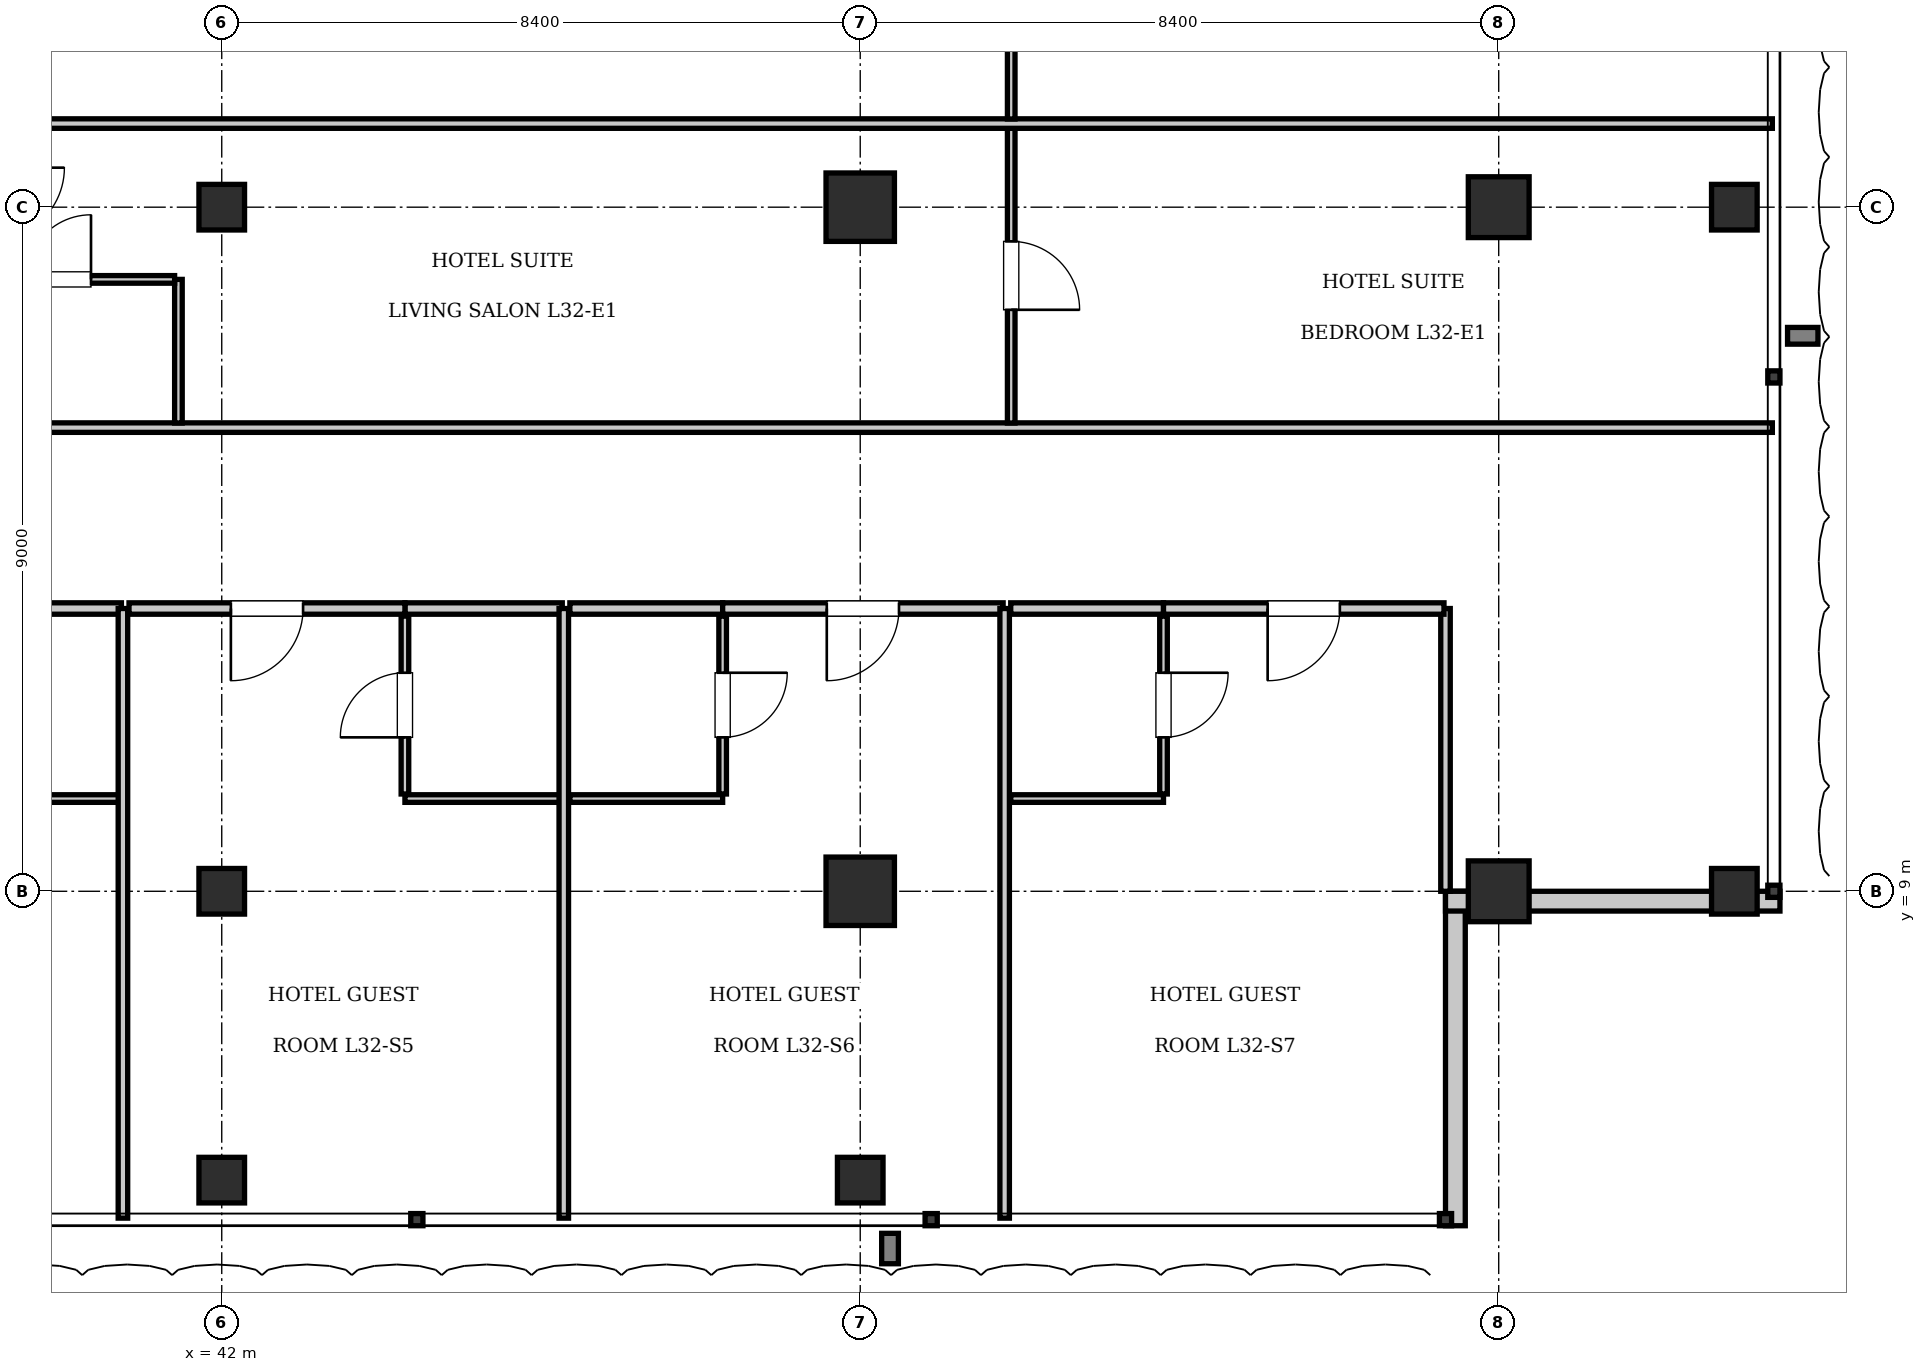
"""IFC4 building model, lengths in metres.
Left out: names, types, materials, properties, quantities, classifications, styles, units other than length and angle.
Written with IfcOpenShell. Run it as: python <this file> out.ifc"""

import sys

from ifc_helpers import new_model, si_unit, direction, frame, frame_2d, origin, origin_2d, place, context, subcontext, project, spatial, rectangle, i_section, extrude, element, fill, save


model = new_model("IFC4")
c1 = context("Model", 3, precision=1e-05, world=origin(), true_north=direction((0.0, 1.0)))
c2 = subcontext(c1, "Body", "Model", "MODEL_VIEW")
j1 = project(units=[si_unit("LENGTHUNIT", "METRE"), si_unit("PLANEANGLEUNIT", "RADIAN")], contexts=[c1])
p1 = place(None, origin())
s1 = spatial("IfcSite", under=j1, at=p1, CompositionType="ELEMENT")
p2 = place(p1, origin())
s2 = spatial("IfcBuilding", under=s1, at=p2, CompositionType="ELEMENT")
p3 = place(p2, frame((0.0, 0.0, 135.1)))
s3 = spatial("IfcBuildingStorey", under=s2, at=p3, CompositionType="ELEMENT", Elevation=135.1)
for number, where, z_axis, x_axis in (
    (1, (50.4, 18.0, 0.0), (0.0, 0.0, 1.0), (1.0, 0.0, 0.0)),
    (2, (50.4, 9.0, 0.0), (0.0, 0.0, 1.0), (1.0, 0.0, 0.0)),
):
    element("IfcColumn", number, at=place(p3, frame(where, z_axis=z_axis, x_axis=x_axis)), inside=s3, PredefinedType="COLUMN", context=c2, shape_type="SweptSolid", body=[
        extrude(rectangle(XDim=0.9, YDim=0.9, at=origin_2d()), origin(), (0.0, 0.0, 1.0), 3.85),
    ])
for number, where, z_axis, x_axis in (
    (3, (42.0, 9.0, 0.0), (0.0, 0.0, 1.0), (1.0, 0.0, 0.0)),
    (4, (42.0, 18.0, 0.0), (0.0, 0.0, 1.0), (1.0, 0.0, 0.0)),
):
    element("IfcColumn", number, at=place(p3, frame(where, z_axis=z_axis, x_axis=x_axis)), inside=s3, PredefinedType="COLUMN", context=c2, shape_type="SweptSolid", body=[
        extrude(i_section(OverallWidth=0.6, OverallDepth=0.6, WebThickness=0.025, FlangeThickness=0.038, at=origin_2d()), origin(), (0.0, 0.0, 1.0), 3.85),
    ])
for number, where, z_axis, x_axis in (
    (5, (58.8, 9.0, 0.0), (0.0, 0.0, 1.0), (1.0, 0.0, 0.0)),
    (6, (58.8, 18.0, 0.0), (0.0, 0.0, 1.0), (1.0, 0.0, 0.0)),
):
    element("IfcColumn", number, at=place(p3, frame(where, z_axis=z_axis, x_axis=x_axis)), inside=s3, PredefinedType="COLUMN", context=c2, shape_type="SweptSolid", body=[
        extrude(rectangle(XDim=0.8, YDim=0.8, at=origin_2d()), origin(), (0.0, 0.0, 1.0), 3.85),
    ])
for number, where, z_axis, x_axis in (
    (7, (61.9, 9.0, 0.0), (0.0, 0.0, 1.0), (1.0, 0.0, 0.0)),
    (8, (61.9, 18.0, 0.0), (0.0, 0.0, 1.0), (1.0, 0.0, 0.0)),
    (9, (42.0, 5.2, 0.0), (0.0, 0.0, 1.0), (1.0, 0.0, 0.0)),
    (10, (50.4, 5.2, 0.0), (0.0, 0.0, 1.0), (1.0, 0.0, 0.0)),
):
    element("IfcColumn", number, at=place(p3, frame(where, z_axis=z_axis, x_axis=x_axis)), inside=s3, PredefinedType="COLUMN", context=c2, shape_type="SweptSolid", body=[
        extrude(i_section(OverallWidth=0.6, OverallDepth=0.6, WebThickness=0.025, FlangeThickness=0.038, at=origin_2d()), origin(), (0.0, 0.0, 1.0), 3.85),
    ])
p4 = place(p3, frame((58.23, 9.0, 0.0), z_axis=(0.0, 0.0, 1.0), x_axis=(0.0, -1.0, 0.0)))
e11 = element("IfcWall", 11, at=p4, inside=s3, PredefinedType="SOLIDWALL", context=c2, shape_type="SweptSolid", body=[
    extrude(rectangle(XDim=4.4, YDim=0.26, at=frame_2d((2.2, 0.0))), origin(), (0.0, 0.0, 1.0), 3.61),
])
p5 = place(p3, frame((62.5, 8.87, 0.0), z_axis=(0.0, 0.0, 1.0), x_axis=(-1.0, 0.0, 0.0)))
e12 = element("IfcWall", 12, at=p5, inside=s3, PredefinedType="SOLIDWALL", context=c2, shape_type="SweptSolid", body=[
    extrude(rectangle(XDim=4.4, YDim=0.26, at=frame_2d((2.2, 0.0))), origin(), (0.0, 0.0, 1.0), 2.998),
])
p6 = place(p3, frame((58.1, 9.0, 0.0), z_axis=(0.0, 0.0, 1.0), x_axis=(0.0, 1.0, 0.0)))
e13 = element("IfcWall", 13, at=p6, inside=s3, PredefinedType="PARTITIONING", context=c2, shape_type="SweptSolid", body=[
    extrude(rectangle(XDim=3.72, YDim=0.125, at=frame_2d((1.86, 0.0))), origin(), (0.0, 0.0, 1.0), 3.61),
])
p7 = place(p3, frame((38.61, 12.72, 0.0), z_axis=(0.0, 0.0, 1.0), x_axis=(1.0, 0.0, 0.0)))
e14 = element("IfcWall", 14, at=p7, inside=s3, PredefinedType="PARTITIONING", context=c2, shape_type="SweptSolid", body=[
    extrude(rectangle(XDim=2.07, YDim=0.15, at=frame_2d((1.035, 0.0))), origin(), (0.0, 0.0, 1.0), 3.61),
])
p8 = place(p3, frame((38.61, 10.22, 0.0), z_axis=(0.0, 0.0, 1.0), x_axis=(1.0, 0.0, 0.0)))
e15 = element("IfcWall", 15, at=p8, inside=s3, PredefinedType="PARTITIONING", context=c2, shape_type="SweptSolid", body=[
    extrude(rectangle(XDim=2.05, YDim=0.1, at=frame_2d((1.025, 0.0))), origin(), (0.0, 0.0, 1.0), 3.61),
])
p9 = place(p3, frame((40.7, 4.7, 0.0), z_axis=(0.0, 0.0, 1.0), x_axis=(0.0, 1.0, 0.0)))
e16 = element("IfcWall", 16, at=p9, inside=s3, PredefinedType="PARTITIONING", context=c2, shape_type="SweptSolid", body=[
    extrude(rectangle(XDim=8.02, YDim=0.125, at=frame_2d((4.01, 0.0))), origin(), (0.0, 0.0, 1.0), 3.61),
])
p10 = place(p3, frame((44.41, 12.72, 0.0), z_axis=(0.0, 0.0, 1.0), x_axis=(1.0, 0.0, 0.0)))
e17 = element("IfcWall", 17, at=p10, inside=s3, PredefinedType="PARTITIONING", context=c2, shape_type="SweptSolid", body=[
    extrude(rectangle(XDim=2.07, YDim=0.15, at=frame_2d((1.035, 0.0))), origin(), (0.0, 0.0, 1.0), 3.61),
])
p11 = place(p3, frame((44.41, 10.22, 0.0), z_axis=(0.0, 0.0, 1.0), x_axis=(1.0, 0.0, 0.0)))
e18 = element("IfcWall", 18, at=p11, inside=s3, PredefinedType="PARTITIONING", context=c2, shape_type="SweptSolid", body=[
    extrude(rectangle(XDim=2.05, YDim=0.1, at=frame_2d((1.025, 0.0))), origin(), (0.0, 0.0, 1.0), 3.61),
])
p12 = place(p3, frame((44.41, 10.28, 0.0), z_axis=(0.0, 0.0, 1.0), x_axis=(0.0, 1.0, 0.0)))
e19 = element("IfcWall", 19, at=p12, inside=s3, PredefinedType="PARTITIONING", context=c2, shape_type="SweptSolid", body=[
    extrude(rectangle(XDim=2.34, YDim=0.1, at=frame_2d((1.17, 0.0))), origin(), (0.0, 0.0, 1.0), 3.61),
])
p13 = place(p12, frame((0.745, 0.0, 0.0)))
e20 = element("IfcOpeningElement", 20, at=p13, cuts=e19, PredefinedType="OPENING", context=c2, shape_type="SweptSolid", body=[
    extrude(rectangle(XDim=0.85, YDim=2.1, at=frame_2d((0.425, 1.05))), frame((0.0, 0.06, 0.0), z_axis=(0.0, -1.0, 0.0), x_axis=(1.0, 0.0, 0.0)), (0.0, 0.0, 1.0), 0.12),
])
p14 = place(p3, frame((40.78, 12.72, 0.0), z_axis=(0.0, 0.0, 1.0), x_axis=(1.0, 0.0, 0.0)))
e21 = element("IfcWall", 21, at=p14, inside=s3, PredefinedType="PARTITIONING", context=c2, shape_type="SweptSolid", body=[
    extrude(rectangle(XDim=3.63, YDim=0.15, at=frame_2d((1.815, 0.0))), origin(), (0.0, 0.0, 1.0), 3.61),
])
p15 = place(p14, frame((1.34, 0.0, 0.0)))
e22 = element("IfcOpeningElement", 22, at=p15, cuts=e21, PredefinedType="OPENING", context=c2, shape_type="SweptSolid", body=[
    extrude(rectangle(XDim=0.95, YDim=2.15, at=frame_2d((0.475, 1.075))), frame((0.0, 0.085, 0.0), z_axis=(0.0, -1.0, 0.0), x_axis=(1.0, 0.0, 0.0)), (0.0, 0.0, 1.0), 0.17),
])
p16 = place(p3, frame((46.5, 4.7, 0.0), z_axis=(0.0, 0.0, 1.0), x_axis=(0.0, 1.0, 0.0)))
e23 = element("IfcWall", 23, at=p16, inside=s3, PredefinedType="PARTITIONING", context=c2, shape_type="SweptSolid", body=[
    extrude(rectangle(XDim=8.02, YDim=0.125, at=frame_2d((4.01, 0.0))), origin(), (0.0, 0.0, 1.0), 3.61),
])
p17 = place(p3, frame((46.58, 12.72, 0.0), z_axis=(0.0, 0.0, 1.0), x_axis=(1.0, 0.0, 0.0)))
e24 = element("IfcWall", 24, at=p17, inside=s3, PredefinedType="PARTITIONING", context=c2, shape_type="SweptSolid", body=[
    extrude(rectangle(XDim=2.01, YDim=0.15, at=frame_2d((1.005, 0.0))), origin(), (0.0, 0.0, 1.0), 3.61),
])
p18 = place(p3, frame((46.58, 10.22, 0.0), z_axis=(0.0, 0.0, 1.0), x_axis=(1.0, 0.0, 0.0)))
e25 = element("IfcWall", 25, at=p18, inside=s3, PredefinedType="PARTITIONING", context=c2, shape_type="SweptSolid", body=[
    extrude(rectangle(XDim=2.01, YDim=0.1, at=frame_2d((1.005, 0.0))), origin(), (0.0, 0.0, 1.0), 3.61),
])
p19 = place(p3, frame((48.59, 10.28, 0.0), z_axis=(0.0, 0.0, 1.0), x_axis=(0.0, 1.0, 0.0)))
e26 = element("IfcWall", 26, at=p19, inside=s3, PredefinedType="PARTITIONING", context=c2, shape_type="SweptSolid", body=[
    extrude(rectangle(XDim=2.34, YDim=0.1, at=frame_2d((1.17, 0.0))), origin(), (0.0, 0.0, 1.0), 3.61),
])
p20 = place(p19, frame((0.745, 0.0, 0.0)))
e27 = element("IfcOpeningElement", 27, at=p20, cuts=e26, PredefinedType="OPENING", context=c2, shape_type="SweptSolid", body=[
    extrude(rectangle(XDim=0.85, YDim=2.1, at=frame_2d((0.425, 1.05))), frame((0.0, 0.06, 0.0), z_axis=(0.0, -1.0, 0.0), x_axis=(1.0, 0.0, 0.0)), (0.0, 0.0, 1.0), 0.12),
])
p21 = place(p3, frame((48.59, 12.72, 0.0), z_axis=(0.0, 0.0, 1.0), x_axis=(1.0, 0.0, 0.0)))
e28 = element("IfcWall", 28, at=p21, inside=s3, PredefinedType="PARTITIONING", context=c2, shape_type="SweptSolid", body=[
    extrude(rectangle(XDim=3.69, YDim=0.15, at=frame_2d((1.845, 0.0))), origin(), (0.0, 0.0, 1.0), 3.61),
])
p22 = place(p21, frame((1.37, 0.0, 0.0)))
e29 = element("IfcOpeningElement", 29, at=p22, cuts=e28, PredefinedType="OPENING", context=c2, shape_type="SweptSolid", body=[
    extrude(rectangle(XDim=0.95, YDim=2.15, at=frame_2d((0.475, 1.075))), frame((0.0, 0.085, 0.0), z_axis=(0.0, -1.0, 0.0), x_axis=(1.0, 0.0, 0.0)), (0.0, 0.0, 1.0), 0.17),
])
p23 = place(p3, frame((52.3, 4.7, 0.0), z_axis=(0.0, 0.0, 1.0), x_axis=(0.0, 1.0, 0.0)))
e30 = element("IfcWall", 30, at=p23, inside=s3, PredefinedType="PARTITIONING", context=c2, shape_type="SweptSolid", body=[
    extrude(rectangle(XDim=8.02, YDim=0.125, at=frame_2d((4.01, 0.0))), origin(), (0.0, 0.0, 1.0), 3.61),
])
p24 = place(p3, frame((52.38, 12.72, 0.0), z_axis=(0.0, 0.0, 1.0), x_axis=(1.0, 0.0, 0.0)))
e31 = element("IfcWall", 31, at=p24, inside=s3, PredefinedType="PARTITIONING", context=c2, shape_type="SweptSolid", body=[
    extrude(rectangle(XDim=2.01, YDim=0.15, at=frame_2d((1.005, 0.0))), origin(), (0.0, 0.0, 1.0), 3.61),
])
p25 = place(p3, frame((52.38, 10.22, 0.0), z_axis=(0.0, 0.0, 1.0), x_axis=(1.0, 0.0, 0.0)))
e32 = element("IfcWall", 32, at=p25, inside=s3, PredefinedType="PARTITIONING", context=c2, shape_type="SweptSolid", body=[
    extrude(rectangle(XDim=2.01, YDim=0.1, at=frame_2d((1.005, 0.0))), origin(), (0.0, 0.0, 1.0), 3.61),
])
p26 = place(p3, frame((54.39, 10.28, 0.0), z_axis=(0.0, 0.0, 1.0), x_axis=(0.0, 1.0, 0.0)))
e33 = element("IfcWall", 33, at=p26, inside=s3, PredefinedType="PARTITIONING", context=c2, shape_type="SweptSolid", body=[
    extrude(rectangle(XDim=2.34, YDim=0.1, at=frame_2d((1.17, 0.0))), origin(), (0.0, 0.0, 1.0), 3.61),
])
p27 = place(p26, frame((0.745, 0.0, 0.0)))
e34 = element("IfcOpeningElement", 34, at=p27, cuts=e33, PredefinedType="OPENING", context=c2, shape_type="SweptSolid", body=[
    extrude(rectangle(XDim=0.85, YDim=2.1, at=frame_2d((0.425, 1.05))), frame((0.0, 0.06, 0.0), z_axis=(0.0, -1.0, 0.0), x_axis=(1.0, 0.0, 0.0)), (0.0, 0.0, 1.0), 0.12),
])
p28 = place(p3, frame((54.39, 12.72, 0.0), z_axis=(0.0, 0.0, 1.0), x_axis=(1.0, 0.0, 0.0)))
e35 = element("IfcWall", 35, at=p28, inside=s3, PredefinedType="PARTITIONING", context=c2, shape_type="SweptSolid", body=[
    extrude(rectangle(XDim=3.69, YDim=0.15, at=frame_2d((1.845, 0.0))), origin(), (0.0, 0.0, 1.0), 3.61),
])
p29 = place(p28, frame((1.37, 0.0, 0.0)))
e36 = element("IfcOpeningElement", 36, at=p29, cuts=e35, PredefinedType="OPENING", context=c2, shape_type="SweptSolid", body=[
    extrude(rectangle(XDim=0.95, YDim=2.15, at=frame_2d((0.475, 1.075))), frame((0.0, 0.085, 0.0), z_axis=(0.0, -1.0, 0.0), x_axis=(1.0, 0.0, 0.0)), (0.0, 0.0, 1.0), 0.17),
])
p30 = place(p3, frame((38.98, 15.1, 0.0), z_axis=(0.0, 0.0, 1.0), x_axis=(1.0, 0.0, 0.0)))
e37 = element("IfcWall", 37, at=p30, inside=s3, PredefinedType="PARTITIONING", context=c2, shape_type="SweptSolid", body=[
    extrude(rectangle(XDim=23.42, YDim=0.125, at=frame_2d((11.71, 0.0))), origin(), (0.0, 0.0, 1.0), 3.61),
])
p31 = place(p3, frame((41.43, 15.16, 0.0), z_axis=(0.0, 0.0, 1.0), x_axis=(0.0, 1.0, 0.0)))
e38 = element("IfcWall", 38, at=p31, inside=s3, PredefinedType="PARTITIONING", context=c2, shape_type="SweptSolid", body=[
    extrude(rectangle(XDim=1.89, YDim=0.1, at=frame_2d((0.945, 0.0))), origin(), (0.0, 0.0, 1.0), 3.61),
])
p32 = place(p3, frame((39.08, 17.05, 0.0), z_axis=(0.0, 0.0, 1.0), x_axis=(1.0, 0.0, 0.0)))
e39 = element("IfcWall", 39, at=p32, inside=s3, PredefinedType="PARTITIONING", context=c2, shape_type="SweptSolid", body=[
    extrude(rectangle(XDim=2.3, YDim=0.1, at=frame_2d((1.15, 0.0))), origin(), (0.0, 0.0, 1.0), 3.61),
])
p33 = place(p32, frame((0.35, 0.0, 0.0)))
e40 = element("IfcOpeningElement", 40, at=p33, cuts=e39, PredefinedType="OPENING", context=c2, shape_type="SweptSolid", body=[
    extrude(rectangle(XDim=0.85, YDim=2.1, at=frame_2d((0.425, 1.05))), frame((0.0, 0.06, 0.0), z_axis=(0.0, -1.0, 0.0), x_axis=(1.0, 0.0, 0.0)), (0.0, 0.0, 1.0), 0.12),
])
p34 = place(p3, frame((52.386, 15.16, 0.0), z_axis=(0.0, 0.0, 1.0), x_axis=(0.0, 1.0, 0.0)))
e41 = element("IfcWall", 41, at=p34, inside=s3, PredefinedType="PARTITIONING", context=c2, shape_type="SweptSolid", body=[
    extrude(rectangle(XDim=3.88, YDim=0.1, at=frame_2d((1.94, 0.0))), origin(), (0.0, 0.0, 1.0), 3.61),
])
p35 = place(p34, frame((1.49, 0.0, 0.0)))
e42 = element("IfcOpeningElement", 42, at=p35, cuts=e41, PredefinedType="OPENING", context=c2, shape_type="SweptSolid", body=[
    extrude(rectangle(XDim=0.9, YDim=2.1, at=frame_2d((0.45, 1.05))), frame((0.0, 0.06, 0.0), z_axis=(0.0, -1.0, 0.0), x_axis=(1.0, 0.0, 0.0)), (0.0, 0.0, 1.0), 0.12),
])
p36 = place(p3, frame((38.98, 19.1, 0.0), z_axis=(0.0, 0.0, 1.0), x_axis=(1.0, 0.0, 0.0)))
e43 = element("IfcWall", 43, at=p36, inside=s3, PredefinedType="PARTITIONING", context=c2, shape_type="SweptSolid", body=[
    extrude(rectangle(XDim=23.42, YDim=0.125, at=frame_2d((11.71, 0.0))), origin(), (0.0, 0.0, 1.0), 3.61),
])
p37 = place(p3, frame((52.386, 19.16, 0.0), z_axis=(0.0, 0.0, 1.0), x_axis=(0.0, 1.0, 0.0)))
e44 = element("IfcWall", 44, at=p37, inside=s3, PredefinedType="PARTITIONING", context=c2, shape_type="SweptSolid", body=[
    extrude(rectangle(XDim=3.88, YDim=0.1, at=frame_2d((1.94, 0.0))), origin(), (0.0, 0.0, 1.0), 3.61),
])
p38 = place(p37, frame((1.49, 0.0, 0.0)))
e45 = element("IfcOpeningElement", 45, at=p38, cuts=e44, PredefinedType="OPENING", context=c2, shape_type="SweptSolid", body=[
    extrude(rectangle(XDim=0.9, YDim=2.1, at=frame_2d((0.45, 1.05))), frame((0.0, 0.06, 0.0), z_axis=(0.0, -1.0, 0.0), x_axis=(1.0, 0.0, 0.0)), (0.0, 0.0, 1.0), 0.12),
])
p39 = place(p13, origin())
e46 = element("IfcDoor", 46, at=p39, inside=s3, OperationType="SINGLE_SWING_LEFT", PredefinedType="DOOR", context=c2, shape_type="SweptSolid", body=[
    extrude(rectangle(XDim=0.85, YDim=2.1, at=frame_2d((0.425, 1.05))), frame((0.0, 0.025, 0.0), z_axis=(0.0, -1.0, 0.0), x_axis=(1.0, 0.0, 0.0)), (0.0, 0.0, 1.0), 0.05),
])
fill(e20, e46)
p40 = place(p15, frame((0.95, 0.0, 0.0), z_axis=(0.0, 0.0, 1.0), x_axis=(-1.0, 0.0, 0.0)))
e47 = element("IfcDoor", 47, at=p40, inside=s3, OperationType="SINGLE_SWING_RIGHT", PredefinedType="DOOR", context=c2, shape_type="SweptSolid", body=[
    extrude(rectangle(XDim=0.95, YDim=2.15, at=frame_2d((0.475, 1.075))), frame((0.0, 0.025, 0.0), z_axis=(0.0, -1.0, 0.0), x_axis=(1.0, 0.0, 0.0)), (0.0, 0.0, 1.0), 0.05),
])
fill(e22, e47)
p41 = place(p20, frame((0.85, 0.0, 0.0), z_axis=(0.0, 0.0, 1.0), x_axis=(-1.0, 0.0, 0.0)))
e48 = element("IfcDoor", 48, at=p41, inside=s3, OperationType="SINGLE_SWING_LEFT", PredefinedType="DOOR", context=c2, shape_type="SweptSolid", body=[
    extrude(rectangle(XDim=0.85, YDim=2.1, at=frame_2d((0.425, 1.05))), frame((0.0, 0.025, 0.0), z_axis=(0.0, -1.0, 0.0), x_axis=(1.0, 0.0, 0.0)), (0.0, 0.0, 1.0), 0.05),
])
fill(e27, e48)
p42 = place(p22, frame((0.95, 0.0, 0.0), z_axis=(0.0, 0.0, 1.0), x_axis=(-1.0, 0.0, 0.0)))
e49 = element("IfcDoor", 49, at=p42, inside=s3, OperationType="SINGLE_SWING_RIGHT", PredefinedType="DOOR", context=c2, shape_type="SweptSolid", body=[
    extrude(rectangle(XDim=0.95, YDim=2.15, at=frame_2d((0.475, 1.075))), frame((0.0, 0.025, 0.0), z_axis=(0.0, -1.0, 0.0), x_axis=(1.0, 0.0, 0.0)), (0.0, 0.0, 1.0), 0.05),
])
fill(e29, e49)
p43 = place(p27, frame((0.85, 0.0, 0.0), z_axis=(0.0, 0.0, 1.0), x_axis=(-1.0, 0.0, 0.0)))
e50 = element("IfcDoor", 50, at=p43, inside=s3, OperationType="SINGLE_SWING_LEFT", PredefinedType="DOOR", context=c2, shape_type="SweptSolid", body=[
    extrude(rectangle(XDim=0.85, YDim=2.1, at=frame_2d((0.425, 1.05))), frame((0.0, 0.025, 0.0), z_axis=(0.0, -1.0, 0.0), x_axis=(1.0, 0.0, 0.0)), (0.0, 0.0, 1.0), 0.05),
])
fill(e34, e50)
p44 = place(p29, frame((0.95, 0.0, 0.0), z_axis=(0.0, 0.0, 1.0), x_axis=(-1.0, 0.0, 0.0)))
e51 = element("IfcDoor", 51, at=p44, inside=s3, OperationType="SINGLE_SWING_RIGHT", PredefinedType="DOOR", context=c2, shape_type="SweptSolid", body=[
    extrude(rectangle(XDim=0.95, YDim=2.15, at=frame_2d((0.475, 1.075))), frame((0.0, 0.025, 0.0), z_axis=(0.0, -1.0, 0.0), x_axis=(1.0, 0.0, 0.0)), (0.0, 0.0, 1.0), 0.05),
])
fill(e36, e51)
p45 = place(p33, origin())
e52 = element("IfcDoor", 52, at=p45, inside=s3, OperationType="SINGLE_SWING_RIGHT", PredefinedType="DOOR", context=c2, shape_type="SweptSolid", body=[
    extrude(rectangle(XDim=0.85, YDim=2.1, at=frame_2d((0.425, 1.05))), frame((0.0, 0.025, 0.0), z_axis=(0.0, -1.0, 0.0), x_axis=(1.0, 0.0, 0.0)), (0.0, 0.0, 1.0), 0.05),
])
fill(e40, e52)
p46 = place(p35, frame((0.9, 0.0, 0.0), z_axis=(0.0, 0.0, 1.0), x_axis=(-1.0, 0.0, 0.0)))
e53 = element("IfcDoor", 53, at=p46, inside=s3, OperationType="SINGLE_SWING_RIGHT", PredefinedType="DOOR", context=c2, shape_type="SweptSolid", body=[
    extrude(rectangle(XDim=0.9, YDim=2.1, at=frame_2d((0.45, 1.05))), frame((0.0, 0.025, 0.0), z_axis=(0.0, -1.0, 0.0), x_axis=(1.0, 0.0, 0.0)), (0.0, 0.0, 1.0), 0.05),
])
fill(e42, e53)
save(model, sys.argv[1])
